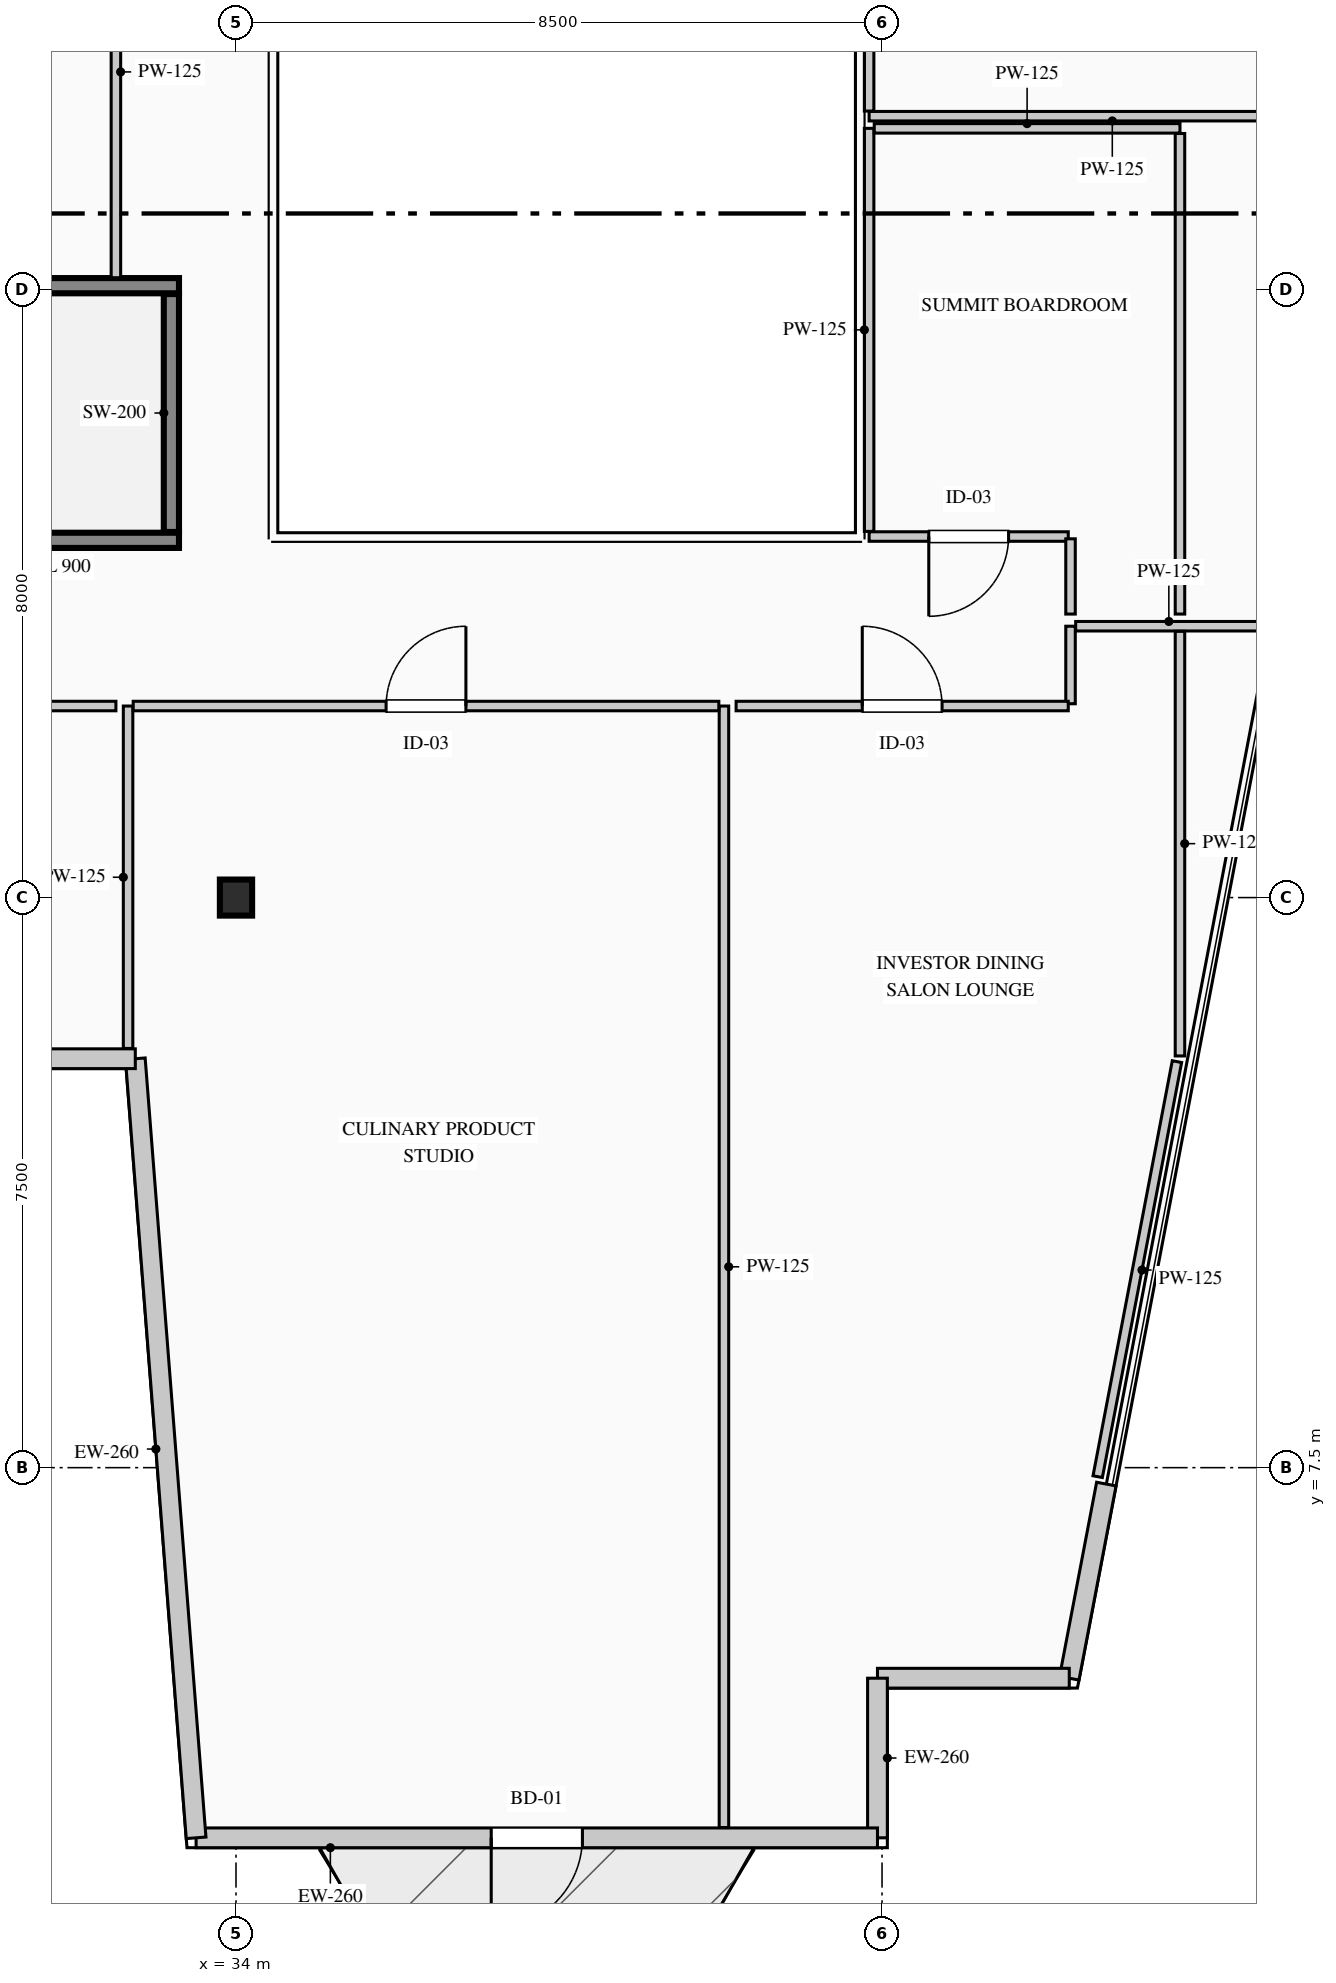
"""IFC4 building model, lengths in metres.
Left out: names, types, materials, properties, quantities, classifications, styles, units other than length and angle.
Written with IfcOpenShell. Run it as: python <this file> out.ifc"""

import sys

from ifc_helpers import new_model, si_unit, direction, frame, frame_2d, origin, origin_2d, place, context, subcontext, project, spatial, rectangle, i_section, extrude, element, fill, save


model = new_model("IFC4")
c1 = context("Model", 3, precision=1e-05, world=origin(), true_north=direction((0.0, 1.0)))
c2 = subcontext(c1, "Body", "Model", "MODEL_VIEW")
j1 = project(units=[si_unit("LENGTHUNIT", "METRE"), si_unit("PLANEANGLEUNIT", "RADIAN")], contexts=[c1])
p1 = place(None, origin())
s1 = spatial("IfcSite", under=j1, at=p1, CompositionType="ELEMENT")
p2 = place(p1, origin())
s2 = spatial("IfcBuilding", under=s1, at=p2, CompositionType="ELEMENT")
p3 = place(p2, frame((0.0, 0.0, 174.6)))
s3 = spatial("IfcBuildingStorey", under=s2, at=p3, CompositionType="ELEMENT", Elevation=174.6)
p4 = place(p3, frame((26.05, 19.7, 0.0), z_axis=(0.0, 0.0, 1.0), x_axis=(1.0, 0.0, 0.0)))
e1 = element("IfcWall", 1, at=p4, inside=s3, PredefinedType="SHEAR", context=c2, shape_type="SweptSolid", body=[
    extrude(rectangle(XDim=7.2, YDim=0.2, at=frame_2d((3.6, 0.0))), origin(), (0.0, 0.0, 1.0), 3.95),
])
p5 = place(p4, frame((0.38, 0.0, 0.0)))
e2 = element("IfcOpeningElement", 2, at=p5, cuts=e1, PredefinedType="OPENING", context=c2, shape_type="SweptSolid", body=[
    extrude(rectangle(XDim=1.15, YDim=2.2, at=frame_2d((0.575, 1.1))), frame((0.0, 0.11, 0.0), z_axis=(0.0, -1.0, 0.0), x_axis=(1.0, 0.0, 0.0)), (0.0, 0.0, 1.0), 0.22),
])
p6 = place(p3, frame((26.05, 23.05, 0.0), z_axis=(0.0, 0.0, 1.0), x_axis=(1.0, 0.0, 0.0)))
e3 = element("IfcWall", 3, at=p6, inside=s3, PredefinedType="SHEAR", context=c2, shape_type="SweptSolid", body=[
    extrude(rectangle(XDim=7.2, YDim=0.2, at=frame_2d((3.6, 0.0))), origin(), (0.0, 0.0, 1.0), 3.95),
])
p7 = place(p3, frame((33.15, 19.81, 0.0), z_axis=(0.0, 0.0, 1.0), x_axis=(0.0, 1.0, 0.0)))
e4 = element("IfcWall", 4, at=p7, inside=s3, PredefinedType="SHEAR", context=c2, shape_type="SweptSolid", body=[
    extrude(rectangle(XDim=3.13, YDim=0.2, at=frame_2d((1.565, 0.0))), origin(), (0.0, 0.0, 1.0), 3.95),
])
p8 = place(p3, frame((34.0, 15.0, 0.0), z_axis=(0.0, 0.0, 1.0), x_axis=(1.0, 0.0, 0.0)))
e5 = element("IfcColumn", 5, at=p8, inside=s3, PredefinedType="COLUMN", context=c2, shape_type="SweptSolid", body=[
    extrude(i_section(OverallWidth=0.424, OverallDepth=0.474, WebThickness=0.048, FlangeThickness=0.077, FilletRadius=0.015, at=origin_2d()), origin(), (0.0, 0.0, 1.0), 3.95),
])
p9 = place(p3, frame((45.451, 7.284, 0.0), z_axis=(0.0, 0.0, 1.0), x_axis=(-0.187621263149, -0.982241447718, 0.0)))
e6 = element("IfcWall", 6, at=p9, inside=s3, PredefinedType="STANDARD", context=c2, shape_type="SweptSolid", body=[
    extrude(rectangle(XDim=2.6, YDim=0.26, at=frame_2d((1.3, 0.0))), origin(), (0.0, 0.0, 1.0), 3.6),
])
p10 = place(p3, frame((44.963, 4.73, 0.0), z_axis=(0.0, 0.0, 1.0), x_axis=(-1.0, 0.0, 0.0)))
e7 = element("IfcWall", 7, at=p10, inside=s3, PredefinedType="STANDARD", context=c2, shape_type="SweptSolid", body=[
    extrude(rectangle(XDim=2.523, YDim=0.26, at=frame_2d((1.262, 0.0))), origin(), (0.0, 0.0, 1.0), 3.6),
])
p11 = place(p3, frame((42.44, 4.73, 0.0), z_axis=(0.0, 0.0, 1.0), x_axis=(0.0, -1.0, 0.0)))
e8 = element("IfcWall", 8, at=p11, inside=s3, PredefinedType="STANDARD", context=c2, shape_type="SweptSolid", body=[
    extrude(rectangle(XDim=2.1, YDim=0.26, at=frame_2d((1.05, 0.0))), origin(), (0.0, 0.0, 1.0), 3.6),
])
p12 = place(p3, frame((42.44, 2.63, 0.0), z_axis=(0.0, 0.0, 1.0), x_axis=(-1.0, 0.0, 0.0)))
e9 = element("IfcWall", 9, at=p12, inside=s3, PredefinedType="STANDARD", context=c2, shape_type="SweptSolid", body=[
    extrude(rectangle(XDim=8.965, YDim=0.26, at=frame_2d((4.482, 0.0))), origin(), (0.0, 0.0, 1.0), 3.6),
])
p13 = place(p12, frame((3.882, 0.0, 0.0)))
e10 = element("IfcOpeningElement", 10, at=p13, cuts=e9, PredefinedType="OPENING", context=c2, shape_type="SweptSolid", body=[
    extrude(rectangle(XDim=1.2, YDim=2.2, at=frame_2d((0.6, 1.1))), frame((0.0, 0.14, 0.0), z_axis=(0.0, -1.0, 0.0), x_axis=(1.0, 0.0, 0.0)), (0.0, 0.0, 1.0), 0.28),
])
p14 = place(p3, frame((33.475, 2.63, 0.0), z_axis=(0.0, 0.0, 1.0), x_axis=(-0.077793257511, 0.996969512616, 0.0)))
e11 = element("IfcWall", 11, at=p14, inside=s3, PredefinedType="STANDARD", context=c2, shape_type="SweptSolid", body=[
    extrude(rectangle(XDim=10.281, YDim=0.26, at=frame_2d((5.141, 0.0))), origin(), (0.0, 0.0, 1.0), 3.6),
])
p15 = place(p3, frame((32.675, 12.88, 0.0), z_axis=(0.0, 0.0, 1.0), x_axis=(-1.0, 0.0, 0.0)))
e12 = element("IfcWall", 12, at=p15, inside=s3, PredefinedType="STANDARD", context=c2, shape_type="SweptSolid", body=[
    extrude(rectangle(XDim=7.765, YDim=0.26, at=frame_2d((3.883, 0.0))), origin(), (0.0, 0.0, 1.0), 3.6),
])
p16 = place(p15, frame((2.983, 0.0, 0.9)))
e13 = element("IfcOpeningElement", 13, at=p16, cuts=e12, PredefinedType="OPENING", context=c2, shape_type="SweptSolid", body=[
    extrude(rectangle(XDim=1.8, YDim=2.1, at=frame_2d((0.9, 1.05))), frame((0.0, 0.14, 0.0), z_axis=(0.0, -1.0, 0.0), x_axis=(1.0, 0.0, 0.0)), (0.0, 0.0, 1.0), 0.28),
])
p17 = place(p3, frame((40.42, 17.52, 0.0), z_axis=(0.0, 0.0, 1.0), x_axis=(0.0, -1.0, 0.0)))
e14 = element("IfcWall", 14, at=p17, inside=s3, PredefinedType="PARTITIONING", context=c2, shape_type="SweptSolid", body=[
    extrude(rectangle(XDim=14.755, YDim=0.125, at=frame_2d((7.377, 0.0))), origin(), (0.0, 0.0, 1.0), 3.6),
])
p18 = place(p3, frame((32.58, 13.015, 0.0), z_axis=(0.0, 0.0, 1.0), x_axis=(0.0, 1.0, 0.0)))
e15 = element("IfcWall", 15, at=p18, inside=s3, PredefinedType="PARTITIONING", context=c2, shape_type="SweptSolid", body=[
    extrude(rectangle(XDim=4.505, YDim=0.125, at=frame_2d((2.252, 0.0))), origin(), (0.0, 0.0, 1.0), 3.6),
])
p19 = place(p3, frame((32.647, 17.52, 0.0), z_axis=(0.0, 0.0, 1.0), x_axis=(1.0, 0.0, 0.0)))
e16 = element("IfcWall", 16, at=p19, inside=s3, PredefinedType="PARTITIONING", context=c2, shape_type="SweptSolid", body=[
    extrude(rectangle(XDim=7.705, YDim=0.125, at=frame_2d((3.853, 0.0))), origin(), (0.0, 0.0, 1.0), 3.185),
])
p20 = place(p19, frame((3.327, 0.0, 0.0)))
e17 = element("IfcOpeningElement", 17, at=p20, cuts=e16, PredefinedType="OPENING", context=c2, shape_type="SweptSolid", body=[
    extrude(rectangle(XDim=1.05, YDim=2.15, at=frame_2d((0.525, 1.075))), frame((0.0, 0.073, 0.0), z_axis=(0.0, -1.0, 0.0), x_axis=(1.0, 0.0, 0.0)), (0.0, 0.0, 1.0), 0.145),
])
p21 = place(p3, frame((44.98, 17.55, 0.0), z_axis=(0.0, 0.0, 1.0), x_axis=(0.0, 1.0, 0.0)))
e18 = element("IfcWall", 18, at=p21, inside=s3, PredefinedType="PARTITIONING", context=c2, shape_type="SweptSolid", body=[
    extrude(rectangle(XDim=1.02, YDim=0.125, at=frame_2d((0.51, 0.0))), origin(), (0.0, 0.0, 1.0), 3.6),
])
p22 = place(p3, frame((45.048, 18.57, 0.0), z_axis=(0.0, 0.0, 1.0), x_axis=(1.0, 0.0, 0.0)))
e19 = element("IfcWall", 19, at=p22, inside=s3, PredefinedType="PARTITIONING", context=c2, shape_type="SweptSolid", body=[
    extrude(rectangle(XDim=2.452, YDim=0.125, at=frame_2d((1.226, 0.0))), origin(), (0.0, 0.0, 1.0), 3.6),
])
p23 = place(p3, frame((46.42, 18.502, 0.0), z_axis=(0.0, 0.0, 1.0), x_axis=(0.0, -1.0, 0.0)))
e20 = element("IfcWall", 20, at=p23, inside=s3, PredefinedType="PARTITIONING", context=c2, shape_type="SweptSolid", body=[
    extrude(rectangle(XDim=5.586, YDim=0.125, at=frame_2d((2.793, 0.0))), origin(), (0.0, 0.0, 1.0), 3.6),
])
p24 = place(p3, frame((46.38, 12.842, 0.0), z_axis=(0.0, 0.0, 1.0), x_axis=(-0.18761256213, -0.982243109689, 0.0)))
e21 = element("IfcWall", 21, at=p24, inside=s3, PredefinedType="PARTITIONING", context=c2, shape_type="SweptSolid", body=[
    extrude(rectangle(XDim=5.559, YDim=0.125, at=frame_2d((2.78, 0.0))), origin(), (0.0, 0.0, 1.0), 3.6),
])
p25 = place(p3, frame((40.58, 17.52, 0.0), z_axis=(0.0, 0.0, 1.0), x_axis=(1.0, 0.0, 0.0)))
e22 = element("IfcWall", 22, at=p25, inside=s3, PredefinedType="PARTITIONING", context=c2, shape_type="SweptSolid", body=[
    extrude(rectangle(XDim=4.37, YDim=0.125, at=frame_2d((2.185, 0.0))), origin(), (0.0, 0.0, 1.0), 3.6),
])
p26 = place(p25, frame((1.66, 0.0, 0.0)))
e23 = element("IfcOpeningElement", 23, at=p26, cuts=e22, PredefinedType="OPENING", context=c2, shape_type="SweptSolid", body=[
    extrude(rectangle(XDim=1.05, YDim=2.15, at=frame_2d((0.525, 1.075))), frame((0.0, 0.073, 0.0), z_axis=(0.0, -1.0, 0.0), x_axis=(1.0, 0.0, 0.0)), (0.0, 0.0, 1.0), 0.145),
])
p27 = place(p3, frame((24.28, 17.52, 0.0), z_axis=(0.0, 0.0, 1.0), x_axis=(1.0, 0.0, 0.0)))
e24 = element("IfcWall", 24, at=p27, inside=s3, PredefinedType="PARTITIONING", context=c2, shape_type="SweptSolid", body=[
    extrude(rectangle(XDim=8.14, YDim=0.125, at=frame_2d((4.07, 0.0))), origin(), (0.0, 0.0, 1.0), 3.185),
])
p28 = place(p27, frame((3.545, 0.0, 0.0)))
e25 = element("IfcOpeningElement", 25, at=p28, cuts=e24, PredefinedType="OPENING", context=c2, shape_type="SweptSolid", body=[
    extrude(rectangle(XDim=1.05, YDim=2.15, at=frame_2d((0.525, 1.075))), frame((0.0, 0.073, 0.0), z_axis=(0.0, -1.0, 0.0), x_axis=(1.0, 0.0, 0.0)), (0.0, 0.0, 1.0), 0.145),
])
p29 = place(p3, frame((44.95, 19.75, 0.0), z_axis=(0.0, 0.0, 1.0), x_axis=(-1.0, 0.0, 0.0)))
e26 = element("IfcWall", 26, at=p29, inside=s3, PredefinedType="PARTITIONING", context=c2, shape_type="SweptSolid", body=[
    extrude(rectangle(XDim=2.62, YDim=0.125, at=frame_2d((1.31, 0.0))), origin(), (0.0, 0.0, 1.0), 3.6),
])
p30 = place(p29, frame((0.785, 0.0, 0.0)))
e27 = element("IfcOpeningElement", 27, at=p30, cuts=e26, PredefinedType="OPENING", context=c2, shape_type="SweptSolid", body=[
    extrude(rectangle(XDim=1.05, YDim=2.15, at=frame_2d((0.525, 1.075))), frame((0.0, 0.073, 0.0), z_axis=(0.0, -1.0, 0.0), x_axis=(1.0, 0.0, 0.0)), (0.0, 0.0, 1.0), 0.145),
])
p31 = place(p3, frame((42.33, 19.817, 0.0), z_axis=(0.0, 0.0, 1.0), x_axis=(0.0, 1.0, 0.0)))
e28 = element("IfcWall", 28, at=p31, inside=s3, PredefinedType="PARTITIONING", context=c2, shape_type="SweptSolid", body=[
    extrude(rectangle(XDim=5.303, YDim=0.125, at=frame_2d((2.651, 0.0))), origin(), (0.0, 0.0, 1.0), 3.6),
])
p32 = place(p3, frame((42.397, 25.12, 0.0), z_axis=(0.0, 0.0, 1.0), x_axis=(1.0, 0.0, 0.0)))
e29 = element("IfcWall", 29, at=p32, inside=s3, PredefinedType="PARTITIONING", context=c2, shape_type="SweptSolid", body=[
    extrude(rectangle(XDim=4.022, YDim=0.125, at=frame_2d((2.011, 0.0))), origin(), (0.0, 0.0, 1.0), 3.6),
])
p33 = place(p3, frame((46.42, 25.052, 0.0), z_axis=(0.0, 0.0, 1.0), x_axis=(0.0, -1.0, 0.0)))
e30 = element("IfcWall", 30, at=p33, inside=s3, PredefinedType="PARTITIONING", context=c2, shape_type="SweptSolid", body=[
    extrude(rectangle(XDim=6.323, YDim=0.125, at=frame_2d((3.161, 0.0))), origin(), (0.0, 0.0, 1.0), 3.6),
])
p34 = place(p3, frame((44.98, 18.73, 0.0), z_axis=(0.0, 0.0, 1.0), x_axis=(0.0, 1.0, 0.0)))
e31 = element("IfcWall", 31, at=p34, inside=s3, PredefinedType="PARTITIONING", context=c2, shape_type="SweptSolid", body=[
    extrude(rectangle(XDim=0.99, YDim=0.125, at=frame_2d((0.495, 0.0))), origin(), (0.0, 0.0, 1.0), 3.6),
])
p35 = place(p3, frame((32.42, 28.57, 0.0), z_axis=(0.0, 0.0, 1.0), x_axis=(0.0, -1.0, 0.0)))
e32 = element("IfcWall", 32, at=p35, inside=s3, PredefinedType="PARTITIONING", context=c2, shape_type="SweptSolid", body=[
    extrude(rectangle(XDim=5.415, YDim=0.125, at=frame_2d((2.708, 0.0))), origin(), (0.0, 0.0, 1.0), 3.6),
])
p36 = place(p3, frame((48.729, 25.28, 0.0), z_axis=(0.0, 0.0, 1.0), x_axis=(-1.0, 0.0, 0.0)))
e33 = element("IfcWall", 33, at=p36, inside=s3, PredefinedType="PARTITIONING", context=c2, shape_type="SweptSolid", body=[
    extrude(rectangle(XDim=6.399, YDim=0.125, at=frame_2d((3.2, 0.0))), origin(), (0.0, 0.0, 1.0), 3.6),
])
p37 = place(p3, frame((42.33, 25.347, 0.0), z_axis=(0.0, 0.0, 1.0), x_axis=(0.0, 1.0, 0.0)))
e34 = element("IfcWall", 34, at=p37, inside=s3, PredefinedType="PARTITIONING", context=c2, shape_type="SweptSolid", body=[
    extrude(rectangle(XDim=3.282, YDim=0.125, at=frame_2d((1.641, 0.0))), origin(), (0.0, 0.0, 1.0), 3.6),
])
p38 = place(p13, origin())
e35 = element("IfcDoor", 35, at=p38, inside=s3, OperationType="SINGLE_SWING_RIGHT", PredefinedType="DOOR", context=c2, shape_type="SweptSolid", body=[
    extrude(rectangle(XDim=1.2, YDim=2.2, at=frame_2d((0.6, 1.1))), frame((0.0, 0.025, 0.0), z_axis=(0.0, -1.0, 0.0), x_axis=(1.0, 0.0, 0.0)), (0.0, 0.0, 1.0), 0.05),
])
fill(e10, e35)
p39 = place(p20, origin())
e36 = element("IfcDoor", 36, at=p39, inside=s3, OperationType="SINGLE_SWING_RIGHT", PredefinedType="DOOR", context=c2, shape_type="SweptSolid", body=[
    extrude(rectangle(XDim=1.05, YDim=2.15, at=frame_2d((0.525, 1.075))), frame((0.0, 0.025, 0.0), z_axis=(0.0, -1.0, 0.0), x_axis=(1.0, 0.0, 0.0)), (0.0, 0.0, 1.0), 0.05),
])
fill(e17, e36)
p40 = place(p26, origin())
e37 = element("IfcDoor", 37, at=p40, inside=s3, OperationType="SINGLE_SWING_LEFT", PredefinedType="DOOR", context=c2, shape_type="SweptSolid", body=[
    extrude(rectangle(XDim=1.05, YDim=2.15, at=frame_2d((0.525, 1.075))), frame((0.0, 0.025, 0.0), z_axis=(0.0, -1.0, 0.0), x_axis=(1.0, 0.0, 0.0)), (0.0, 0.0, 1.0), 0.05),
])
fill(e23, e37)
p41 = place(p30, origin())
e38 = element("IfcDoor", 38, at=p41, inside=s3, OperationType="SINGLE_SWING_RIGHT", PredefinedType="DOOR", context=c2, shape_type="SweptSolid", body=[
    extrude(rectangle(XDim=1.05, YDim=2.15, at=frame_2d((0.525, 1.075))), frame((0.0, 0.025, 0.0), z_axis=(0.0, -1.0, 0.0), x_axis=(1.0, 0.0, 0.0)), (0.0, 0.0, 1.0), 0.05),
])
fill(e27, e38)
save(model, sys.argv[1])
